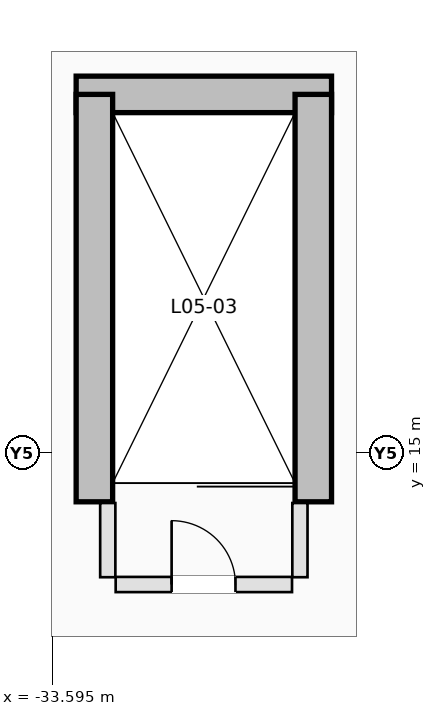
"""IFC4 building model, lengths in metres.
Left out: names, types, materials, properties, quantities, classifications, styles, units other than length and angle.
Written with IfcOpenShell. Run it as: python <this file> out.ifc"""

import sys

from ifc_helpers import new_model, si_unit, direction, frame, frame_2d, origin, place, context, subcontext, project, spatial, rectangle, extrude, element, fill, save


model = new_model("IFC4")
c1 = context("Model", 3, precision=1e-05, world=origin(), true_north=direction((0.0, 1.0)))
c2 = subcontext(c1, "Body", "Model", "MODEL_VIEW")
j1 = project(units=[si_unit("LENGTHUNIT", "METRE"), si_unit("PLANEANGLEUNIT", "RADIAN")], contexts=[c1])
p1 = place(None, origin())
s1 = spatial("IfcSite", under=j1, at=p1, CompositionType="ELEMENT")
p2 = place(p1, origin())
s2 = spatial("IfcBuilding", under=s1, at=p2, CompositionType="ELEMENT")
p3 = place(p2, frame((0.0, 0.0, 23.0)))
s3 = spatial("IfcBuildingStorey", under=s2, at=p3, CompositionType="ELEMENT", Elevation=23.0)
p4 = place(p3, frame((-33.2, 20.9, 0.0), z_axis=(0.0, 0.0, 1.0), x_axis=(1.0, 0.0, 0.0)))
e1 = element("IfcWall", 1, at=p4, inside=s3, PredefinedType="SHEAR", context=c2, shape_type="SweptSolid", body=[
    extrude(rectangle(XDim=4.2, YDim=0.6, at=frame_2d((2.1, 0.0))), origin(), (0.0, 0.0, 1.0), 4.6),
])
for number, where, z_axis, x_axis in (
    (2, (-32.9, 14.2, 0.0), (0.0, 0.0, 1.0), (0.0, 1.0, 0.0)),
    (3, (-29.3, 14.2, 0.0), (0.0, 0.0, 1.0), (0.0, 1.0, 0.0)),
):
    element("IfcWall", number, at=place(p3, frame(where, z_axis=z_axis, x_axis=x_axis)), inside=s3, PredefinedType="SHEAR", context=c2, shape_type="SweptSolid", body=[
        extrude(rectangle(XDim=6.7, YDim=0.6, at=frame_2d((3.35, 0.0))), origin(), (0.0, 0.0, 1.0), 4.6),
    ])
p5 = place(p3, frame((-32.55, 12.84, 0.0), z_axis=(0.0, 0.0, 1.0), x_axis=(1.0, 0.0, 0.0)))
e4 = element("IfcWall", 4, at=p5, inside=s3, PredefinedType="PARTITIONING", context=c2, shape_type="SweptSolid", body=[
    extrude(rectangle(XDim=2.9, YDim=0.25, at=frame_2d((1.45, 0.0))), origin(), (0.0, 0.0, 1.0), 4.35),
])
p6 = place(p5, frame((0.92, 0.0, 0.0)))
e5 = element("IfcOpeningElement", 5, at=p6, cuts=e4, PredefinedType="OPENING", context=c2, shape_type="SweptSolid", body=[
    extrude(rectangle(XDim=1.05, YDim=2.15, at=frame_2d((0.525, 1.075))), frame((0.0, 0.135, 0.0), z_axis=(0.0, -1.0, 0.0), x_axis=(1.0, 0.0, 0.0)), (0.0, 0.0, 1.0), 0.27),
])
for number, where, z_axis, x_axis in (
    (6, (-32.68, 12.96, 0.0), (0.0, 0.0, 1.0), (0.0, 1.0, 0.0)),
    (7, (-29.52, 12.96, 0.0), (0.0, 0.0, 1.0), (0.0, 1.0, 0.0)),
):
    element("IfcWall", number, at=place(p3, frame(where, z_axis=z_axis, x_axis=x_axis)), inside=s3, PredefinedType="PARTITIONING", context=c2, shape_type="SweptSolid", body=[
        extrude(rectangle(XDim=1.22, YDim=0.25, at=frame_2d((0.61, 0.0))), origin(), (0.0, 0.0, 1.0), 4.35),
    ])
p7 = place(p6, origin())
e8 = element("IfcDoor", 8, at=p7, inside=s3, OperationType="SINGLE_SWING_LEFT", PredefinedType="DOOR", context=c2, shape_type="SweptSolid", body=[
    extrude(rectangle(XDim=1.05, YDim=2.15, at=frame_2d((0.525, 1.075))), frame((0.0, 0.025, 0.0), z_axis=(0.0, -1.0, 0.0), x_axis=(1.0, 0.0, 0.0)), (0.0, 0.0, 1.0), 0.05),
])
fill(e5, e8)
save(model, sys.argv[1])
